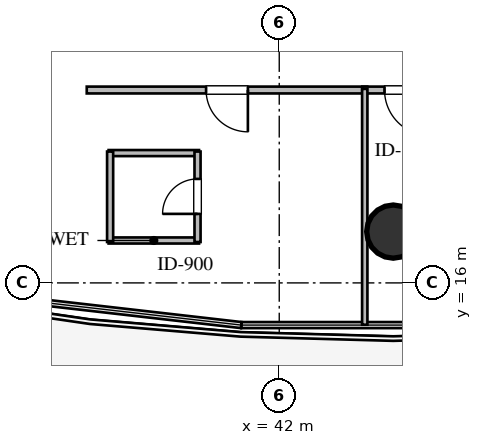
"""IFC4 building model, lengths in metres.
Left out: names, types, materials, properties, quantities, classifications, styles, units other than length and angle.
Written with IfcOpenShell. Run it as: python <this file> out.ifc"""

import sys

from ifc_helpers import new_model, si_unit, direction, frame, frame_2d, origin, origin_2d, place, context, subcontext, project, spatial, rectangle, circle, extrude, element, fill, save


model = new_model("IFC4")
c1 = context("Model", 3, precision=1e-05, world=origin(), true_north=direction((0.0, 1.0)))
c2 = subcontext(c1, "Body", "Model", "MODEL_VIEW")
j1 = project(units=[si_unit("LENGTHUNIT", "METRE"), si_unit("PLANEANGLEUNIT", "RADIAN")], contexts=[c1])
p1 = place(None, origin())
s1 = spatial("IfcSite", under=j1, at=p1, CompositionType="ELEMENT")
p2 = place(p1, origin())
s2 = spatial("IfcBuilding", under=s1, at=p2, CompositionType="ELEMENT")
p3 = place(p2, frame((0.0, 0.0, 45.6)))
s3 = spatial("IfcBuildingStorey", under=s2, at=p3, CompositionType="ELEMENT", Elevation=45.6)
p4 = place(p3, frame((45.0, 17.35, 0.0), z_axis=(0.0, 0.0, 1.0), x_axis=(1.0, 0.0, 0.0)))
e1 = element("IfcColumn", 1, at=p4, inside=s3, PredefinedType="COLUMN", context=c2, shape_type="SweptSolid", body=[
    extrude(circle(Radius=0.7, at=origin_2d()), origin(), (0.0, 0.0, 1.0), 3.6),
])
for number, where, z_axis, x_axis in (
    (2, (37.51, 17.116, 0.0), (0.0, 0.0, 1.0), (1.0, 0.0, 0.0)),
    (3, (37.51, 19.416, 0.0), (0.0, 0.0, 1.0), (1.0, 0.0, 0.0)),
):
    element("IfcWall", number, at=place(p3, frame(where, z_axis=z_axis, x_axis=x_axis)), inside=s3, PredefinedType="PLUMBINGWALL", context=c2, shape_type="SweptSolid", body=[
        extrude(rectangle(XDim=2.38, YDim=0.16, at=frame_2d((1.19, 0.0))), origin(), (0.0, 0.0, 1.0), 3.36),
    ])
p5 = place(p3, frame((37.55, 17.076, 0.0), z_axis=(0.0, 0.0, 1.0), x_axis=(0.0, 1.0, 0.0)))
e4 = element("IfcWall", 4, at=p5, inside=s3, PredefinedType="PLUMBINGWALL", context=c2, shape_type="SweptSolid", body=[
    extrude(rectangle(XDim=2.38, YDim=0.16, at=frame_2d((1.19, 0.0))), origin(), (0.0, 0.0, 1.0), 3.36),
])
p6 = place(p3, frame((39.85, 17.076, 0.0), z_axis=(0.0, 0.0, 1.0), x_axis=(0.0, 1.0, 0.0)))
e5 = element("IfcWall", 5, at=p6, inside=s3, PredefinedType="PLUMBINGWALL", context=c2, shape_type="SweptSolid", body=[
    extrude(rectangle(XDim=2.38, YDim=0.16, at=frame_2d((1.19, 0.0))), origin(), (0.0, 0.0, 1.0), 3.36),
])
p7 = place(p6, frame((0.74, 0.0, 0.0)))
e6 = element("IfcOpeningElement", 6, at=p7, cuts=e5, PredefinedType="OPENING", context=c2, shape_type="SweptSolid", body=[
    extrude(rectangle(XDim=0.92, YDim=2.1, at=frame_2d((0.46, 1.05))), frame((0.0, 0.09, 0.0), z_axis=(0.0, -1.0, 0.0), x_axis=(1.0, 0.0, 0.0)), (0.0, 0.0, 1.0), 0.18),
])
p8 = place(p3, frame((44.315, 21.075, 0.0), z_axis=(0.0, 0.0, 1.0), x_axis=(-1.0, 0.0, 0.0)))
e7 = element("IfcWall", 7, at=p8, inside=s3, PredefinedType="PARTITIONING", context=c2, shape_type="SweptSolid", body=[
    extrude(rectangle(XDim=7.38, YDim=0.18, at=frame_2d((3.69, 0.0))), origin(), (0.0, 0.0, 1.0), 2.996),
])
p9 = place(p8, frame((3.14, 0.0, 0.0)))
e8 = element("IfcOpeningElement", 8, at=p9, cuts=e7, PredefinedType="OPENING", context=c2, shape_type="SweptSolid", body=[
    extrude(rectangle(XDim=1.1, YDim=2.1, at=frame_2d((0.55, 1.05))), frame((0.0, 0.1, 0.0), z_axis=(0.0, -1.0, 0.0), x_axis=(1.0, 0.0, 0.0)), (0.0, 0.0, 1.0), 0.2),
])
p10 = place(p3, frame((46.555, 21.075, 0.0), z_axis=(0.0, 0.0, 1.0), x_axis=(-1.0, 0.0, 0.0)))
e9 = element("IfcWall", 9, at=p10, inside=s3, PredefinedType="PARTITIONING", context=c2, shape_type="SweptSolid", body=[
    extrude(rectangle(XDim=2.37, YDim=0.18, at=frame_2d((1.185, 0.0))), origin(), (0.0, 0.0, 1.0), 3.36),
])
p11 = place(p10, frame((0.585, 0.0, 0.0)))
e10 = element("IfcOpeningElement", 10, at=p11, cuts=e9, PredefinedType="OPENING", context=c2, shape_type="SweptSolid", body=[
    extrude(rectangle(XDim=1.2, YDim=2.15, at=frame_2d((0.6, 1.075))), frame((0.0, 0.1, 0.0), z_axis=(0.0, -1.0, 0.0), x_axis=(1.0, 0.0, 0.0)), (0.0, 0.0, 1.0), 0.2),
])
p12 = place(p3, frame((44.25, 21.105, 0.0), z_axis=(0.0, 0.0, 1.0), x_axis=(0.0, -1.0, 0.0)))
e11 = element("IfcWall", 11, at=p12, inside=s3, PredefinedType="PARTITIONING", context=c2, shape_type="SweptSolid", body=[
    extrude(rectangle(XDim=6.205, YDim=0.14, at=frame_2d((3.103, 0.0))), origin(), (0.0, 0.0, 1.0), 2.89),
])
p13 = place(p7, origin())
e12 = element("IfcDoor", 12, at=p13, inside=s3, OperationType="SINGLE_SWING_LEFT", PredefinedType="DOOR", context=c2, shape_type="SweptSolid", body=[
    extrude(rectangle(XDim=0.92, YDim=2.1, at=frame_2d((0.46, 1.05))), frame((0.0, 0.025, 0.0), z_axis=(0.0, -1.0, 0.0), x_axis=(1.0, 0.0, 0.0)), (0.0, 0.0, 1.0), 0.05),
])
fill(e6, e12)
p14 = place(p9, origin())
e13 = element("IfcDoor", 13, at=p14, inside=s3, OperationType="SINGLE_SWING_LEFT", PredefinedType="DOOR", context=c2, shape_type="SweptSolid", body=[
    extrude(rectangle(XDim=1.1, YDim=2.1, at=frame_2d((0.55, 1.05))), frame((0.0, 0.025, 0.0), z_axis=(0.0, -1.0, 0.0), x_axis=(1.0, 0.0, 0.0)), (0.0, 0.0, 1.0), 0.05),
])
fill(e8, e13)
p15 = place(p11, origin())
e14 = element("IfcDoor", 14, at=p15, inside=s3, OperationType="SINGLE_SWING_LEFT", PredefinedType="DOOR", context=c2, shape_type="SweptSolid", body=[
    extrude(rectangle(XDim=1.2, YDim=2.15, at=frame_2d((0.6, 1.075))), frame((0.0, 0.025, 0.0), z_axis=(0.0, -1.0, 0.0), x_axis=(1.0, 0.0, 0.0)), (0.0, 0.0, 1.0), 0.05),
])
fill(e10, e14)
save(model, sys.argv[1])
